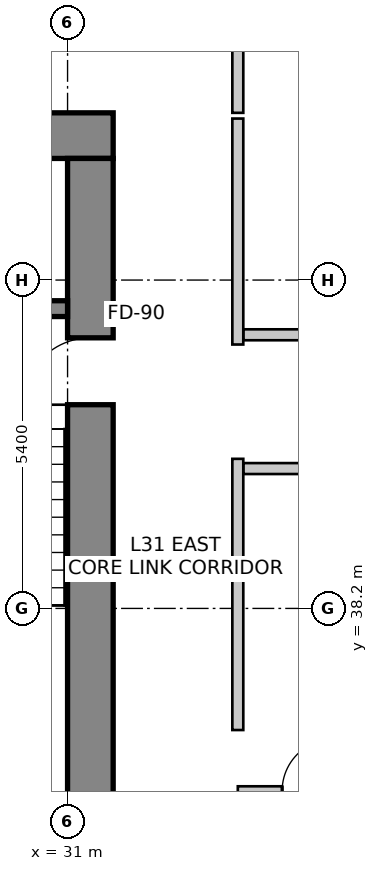
"""IFC4 building model, lengths in metres.
Left out: names, types, materials, properties, quantities, classifications, styles, units other than length and angle.
Written with IfcOpenShell. Run it as: python <this file> out.ifc"""

import sys

from ifc_helpers import new_model, si_unit, direction, frame, frame_2d, origin, place, context, subcontext, project, spatial, rectangle, extrude, source, transform, mapped, element, fill, save


model = new_model("IFC4")
c1 = context("Model", 3, precision=1e-05, world=origin(), true_north=direction((0.0, 1.0)))
c2 = subcontext(c1, "Body", "Model", "MODEL_VIEW")
j1 = project(units=[si_unit("LENGTHUNIT", "METRE"), si_unit("PLANEANGLEUNIT", "RADIAN")], contexts=[c1])
p1 = place(None, origin())
s1 = spatial("IfcSite", under=j1, at=p1, CompositionType="ELEMENT")
p2 = place(p1, origin())
s2 = spatial("IfcBuilding", under=s1, at=p2, CompositionType="ELEMENT")
p3 = place(p2, frame((0.0, 0.0, 128.6)))
s3 = spatial("IfcBuildingStorey", under=s2, at=p3, CompositionType="ELEMENT", Elevation=128.6)
p4 = place(p3, frame((15.85, 45.975, 0.0), z_axis=(0.0, 0.0, 1.0), x_axis=(1.0, 0.0, 0.0)))
e1 = element("IfcWall", 1, at=p4, inside=s3, PredefinedType="SHEAR", context=c2, shape_type="SweptSolid", body=[
    extrude(rectangle(XDim=15.9, YDim=0.75, at=frame_2d((7.95, 0.0))), origin(), (0.0, 0.0, 1.0), 3.6),
])
p5 = place(p3, frame((31.375, 34.2, 0.0), z_axis=(0.0, 0.0, 1.0), x_axis=(0.0, 1.0, 0.0)))
e2 = element("IfcWall", 2, at=p5, inside=s3, PredefinedType="SHEAR", context=c2, shape_type="SweptSolid", body=[
    extrude(rectangle(XDim=11.4, YDim=0.75, at=frame_2d((5.7, 0.0))), origin(), (0.0, 0.0, 1.0), 3.6),
])
m1 = source(origin(), c2, "Body", "SweptSolid", [
    extrude(rectangle(XDim=1.1, YDim=2.15, at=frame_2d((0.55, 1.075))), frame((0.0, 0.385, 0.0), z_axis=(0.0, -1.0, 0.0), x_axis=(1.0, 0.0, 0.0)), (0.0, 0.0, 1.0), 0.77),
])
p6 = place(p5, frame((7.35, 0.0, 0.0)))
e3 = element("IfcOpeningElement", 3, at=p6, cuts=e2, PredefinedType="OPENING", context=c2, shape_type="MappedRepresentation", body=[
    mapped(m1, transform((0.0, 0.0, 0.0), scale=1.0)),
])
p7 = place(p3, frame((27.5, 43.13, 0.0), z_axis=(0.0, 0.0, 1.0), x_axis=(1.0, 0.0, 0.0)))
e4 = element("IfcWall", 4, at=p7, inside=s3, PredefinedType="SHEAR", context=c2, shape_type="SweptSolid", body=[
    extrude(rectangle(XDim=3.5, YDim=0.26, at=frame_2d((1.75, 0.0))), origin(), (0.0, 0.0, 1.0), 3.6),
])
p8 = place(p3, frame((53.561, 47.48, 0.0), z_axis=(0.0, 0.0, 1.0), x_axis=(-0.985845173895, 0.167658262868, 0.0)))
e5 = element("IfcWall", 5, at=p8, inside=s3, PredefinedType="SOLIDWALL", context=c2, shape_type="SweptSolid", body=[
    extrude(rectangle(XDim=32.132, YDim=0.3, at=frame_2d((16.066, 0.0))), origin(), (0.0, 0.0, 1.0), 3.35),
])
m2 = source(origin(), c2, "Body", "SweptSolid", [
    extrude(rectangle(XDim=2.1, YDim=2.0, at=frame_2d((1.05, 1.0))), frame((0.0, 0.16, 0.0), z_axis=(0.0, -1.0, 0.0), x_axis=(1.0, 0.0, 0.0)), (0.0, 0.0, 1.0), 0.32),
])
p9 = place(p8, frame((1.032, 0.0, 0.85)))
e6 = element("IfcOpeningElement", 6, at=p9, cuts=e5, PredefinedType="OPENING", context=c2, shape_type="MappedRepresentation", body=[
    mapped(m2, transform((0.0, 0.0, 0.0), scale=1.0)),
])
p10 = place(p8, frame((6.836, 0.0, 0.85)))
e7 = element("IfcOpeningElement", 7, at=p10, cuts=e5, PredefinedType="OPENING", context=c2, shape_type="MappedRepresentation", body=[
    mapped(m2, transform((0.0, 0.0, 0.0), scale=1.0)),
])
p11 = place(p8, frame((13.599, 0.0, 0.85)))
e8 = element("IfcOpeningElement", 8, at=p11, cuts=e5, PredefinedType="OPENING", context=c2, shape_type="MappedRepresentation", body=[
    mapped(m2, transform((0.0, 0.0, 0.0), scale=1.0)),
])
m3 = source(origin(), c2, "Body", "SweptSolid", [
    extrude(rectangle(XDim=1.5, YDim=1.8, at=frame_2d((0.75, 0.9))), frame((0.0, 0.16, 0.0), z_axis=(0.0, -1.0, 0.0), x_axis=(1.0, 0.0, 0.0)), (0.0, 0.0, 1.0), 0.32),
])
p12 = place(p8, frame((18.039, 0.0, 0.85)))
e9 = element("IfcOpeningElement", 9, at=p12, cuts=e5, PredefinedType="OPENING", context=c2, shape_type="MappedRepresentation", body=[
    mapped(m3, transform((0.0, 0.0, 0.0), scale=1.0)),
])
p13 = place(p8, frame((20.459, 0.0, 0.85)))
e10 = element("IfcOpeningElement", 10, at=p13, cuts=e5, PredefinedType="OPENING", context=c2, shape_type="MappedRepresentation", body=[
    mapped(m2, transform((0.0, 0.0, 0.0), scale=1.0)),
])
p14 = place(p8, frame((25.55, 0.0, 0.85)))
e11 = element("IfcOpeningElement", 11, at=p14, cuts=e5, PredefinedType="OPENING", context=c2, shape_type="MappedRepresentation", body=[
    mapped(m2, transform((0.0, 0.0, 0.0), scale=1.0)),
])
m4 = source(origin(), c2, "Body", "SweptSolid", [
    extrude(rectangle(XDim=0.9, YDim=1.6, at=frame_2d((0.45, 0.8))), frame((0.0, 0.16, 0.0), z_axis=(0.0, -1.0, 0.0), x_axis=(1.0, 0.0, 0.0)), (0.0, 0.0, 1.0), 0.32),
])
p15 = place(p8, frame((30.65, 0.0, 0.85)))
e12 = element("IfcOpeningElement", 12, at=p15, cuts=e5, PredefinedType="OPENING", context=c2, shape_type="MappedRepresentation", body=[
    mapped(m4, transform((0.0, 0.0, 0.0), scale=1.0)),
])
p16 = place(p3, frame((33.8, 48.5, 0.0), z_axis=(0.0, 0.0, 1.0), x_axis=(0.0, -1.0, 0.0)))
e13 = element("IfcWall", 13, at=p16, inside=s3, PredefinedType="PARTITIONING", context=c2, shape_type="SweptSolid", body=[
    extrude(rectangle(XDim=2.15, YDim=0.18, at=frame_2d((1.075, 0.0))), origin(), (0.0, 0.0, 1.0), 2.492),
])
p17 = place(p3, frame((33.8, 40.66, 0.0), z_axis=(0.0, 0.0, 1.0), x_axis=(0.0, -1.0, 0.0)))
e14 = element("IfcWall", 14, at=p17, inside=s3, PredefinedType="PARTITIONING", context=c2, shape_type="SweptSolid", body=[
    extrude(rectangle(XDim=4.46, YDim=0.18, at=frame_2d((2.23, 0.0))), origin(), (0.0, 0.0, 1.0), 3.35),
])
p18 = place(p3, frame((33.8, 46.256, 0.0), z_axis=(0.0, 0.0, 1.0), x_axis=(0.0, -1.0, 0.0)))
e15 = element("IfcWall", 15, at=p18, inside=s3, PredefinedType="PARTITIONING", context=c2, shape_type="SweptSolid", body=[
    extrude(rectangle(XDim=3.716, YDim=0.18, at=frame_2d((1.858, 0.0))), origin(), (0.0, 0.0, 1.0), 2.879),
])
p19 = place(p3, frame((39.205, 40.5, 0.0), z_axis=(0.0, 0.0, 1.0), x_axis=(-1.0, 0.0, 0.0)))
e16 = element("IfcWall", 16, at=p19, inside=s3, PredefinedType="PARTITIONING", context=c2, shape_type="SweptSolid", body=[
    extrude(rectangle(XDim=5.311, YDim=0.18, at=frame_2d((2.656, 0.0))), origin(), (0.0, 0.0, 1.0), 2.803),
])
m5 = source(origin(), c2, "Body", "SweptSolid", [
    extrude(rectangle(XDim=0.9, YDim=2.15, at=frame_2d((0.45, 1.075))), frame((0.0, 0.1, 0.0), z_axis=(0.0, -1.0, 0.0), x_axis=(1.0, 0.0, 0.0)), (0.0, 0.0, 1.0), 0.2),
])
p20 = place(p19, frame((2.206, 0.0, 0.0)))
e17 = element("IfcOpeningElement", 17, at=p20, cuts=e16, PredefinedType="OPENING", context=c2, shape_type="MappedRepresentation", body=[
    mapped(m5, transform((0.0, 0.0, 0.0), scale=1.0)),
])
p21 = place(p3, frame((33.894, 42.7, 0.0), z_axis=(0.0, 0.0, 1.0), x_axis=(1.0, 0.0, 0.0)))
e18 = element("IfcWall", 18, at=p21, inside=s3, PredefinedType="PARTITIONING", context=c2, shape_type="SweptSolid", body=[
    extrude(rectangle(XDim=8.266, YDim=0.18, at=frame_2d((4.133, 0.0))), origin(), (0.0, 0.0, 1.0), 2.803),
])
p22 = place(p21, frame((3.075, 0.0, 0.0)))
e19 = element("IfcOpeningElement", 19, at=p22, cuts=e18, PredefinedType="OPENING", context=c2, shape_type="MappedRepresentation", body=[
    mapped(m5, transform((0.0, 0.0, 0.0), scale=1.0)),
])
p23 = place(p3, frame((33.8, 35.2, 0.0), z_axis=(0.0, 0.0, 1.0), x_axis=(1.0, 0.0, 0.0)))
e20 = element("IfcWall", 20, at=p23, inside=s3, PredefinedType="PARTITIONING", context=c2, shape_type="SweptSolid", body=[
    extrude(rectangle(XDim=2.308, YDim=0.15, at=frame_2d((1.154, 0.0))), origin(), (0.0, 0.0, 1.0), 3.35),
])
m6 = source(origin(), c2, "Body", "SweptSolid", [
    extrude(rectangle(XDim=0.85, YDim=2.15, at=frame_2d((0.425, 1.075))), frame((0.0, 0.085, 0.0), z_axis=(0.0, -1.0, 0.0), x_axis=(1.0, 0.0, 0.0)), (0.0, 0.0, 1.0), 0.17),
])
p24 = place(p23, frame((0.729, 0.0, 0.0)))
e21 = element("IfcOpeningElement", 21, at=p24, cuts=e20, PredefinedType="OPENING", context=c2, shape_type="MappedRepresentation", body=[
    mapped(m6, transform((0.0, 0.0, 0.0), scale=1.0)),
])
m7 = source(origin(), c2, "Body", "SweptSolid", [
    extrude(rectangle(XDim=1.1, YDim=2.15, at=frame_2d((0.55, 1.075))), frame((0.0, 0.025, 0.0), z_axis=(0.0, -1.0, 0.0), x_axis=(1.0, 0.0, 0.0)), (0.0, 0.0, 1.0), 0.05),
])
p25 = place(p6, origin())
e22 = element("IfcDoor", 22, at=p25, inside=s3, OperationType="SINGLE_SWING_LEFT", PredefinedType="DOOR", context=c2, shape_type="MappedRepresentation", body=[
    mapped(m7, transform((0.0, 0.0, 0.0), scale=1.0)),
])
fill(e3, e22)
m8 = source(origin(), c2, "Body", "SweptSolid", [
    extrude(rectangle(XDim=0.85, YDim=2.15, at=frame_2d((0.425, 1.075))), frame((0.0, 0.025, 0.0), z_axis=(0.0, -1.0, 0.0), x_axis=(1.0, 0.0, 0.0)), (0.0, 0.0, 1.0), 0.05),
])
p26 = place(p24, origin())
e23 = element("IfcDoor", 23, at=p26, inside=s3, OperationType="SINGLE_SWING_RIGHT", PredefinedType="DOOR", context=c2, shape_type="MappedRepresentation", body=[
    mapped(m8, transform((0.0, 0.0, 0.0), scale=1.0)),
])
fill(e21, e23)
save(model, sys.argv[1])
